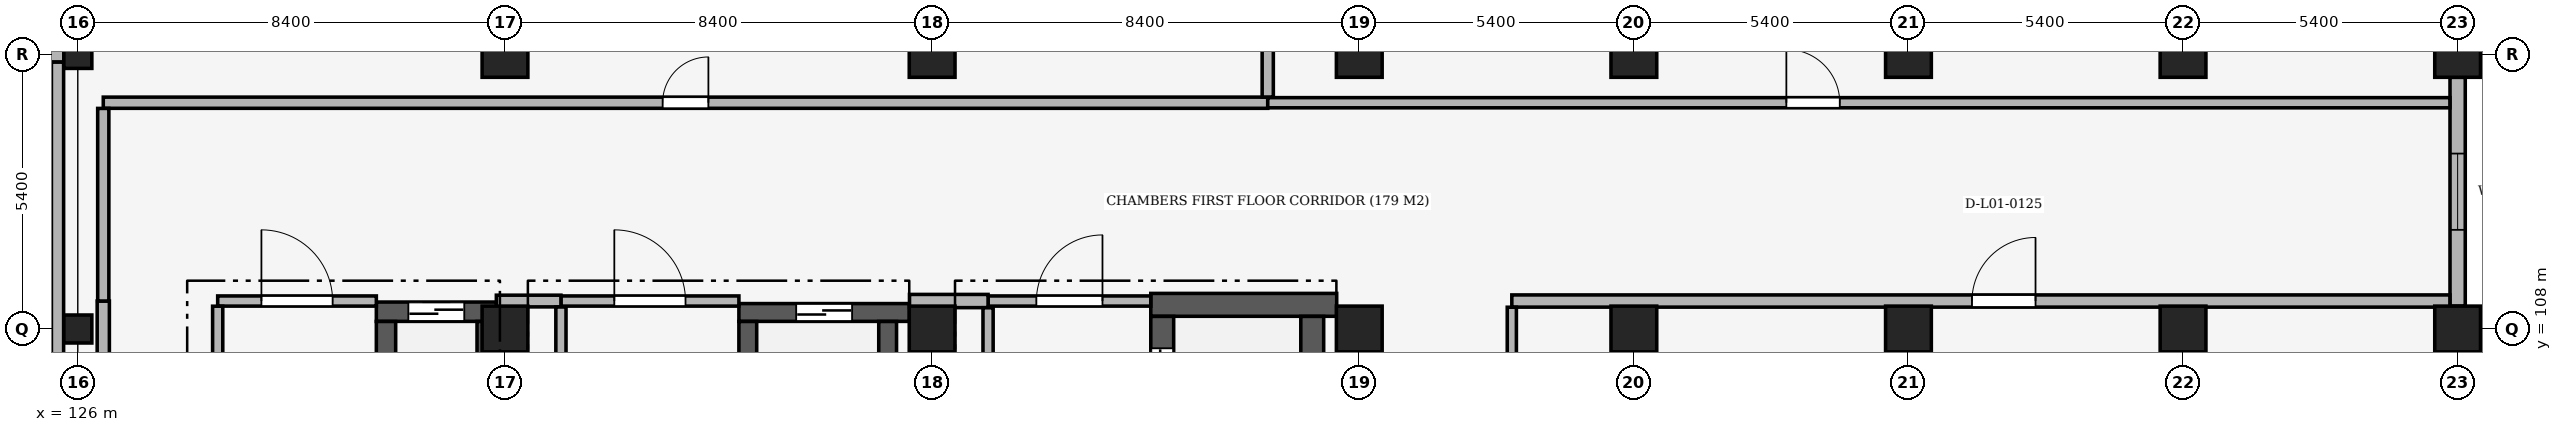
"""IFC4 building model, lengths in metres.
Left out: names, types, materials, properties, quantities, classifications, styles, units other than length and angle.
Written with IfcOpenShell. Run it as: python <this file> out.ifc"""

import sys

from ifc_helpers import new_model, si_unit, direction, frame, frame_2d, origin, origin_2d, place, context, subcontext, project, spatial, rectangle, extrude, element, fill, save


model = new_model("IFC4")
c1 = context("Model", 3, precision=1e-05, world=origin(), true_north=direction((0.0, 1.0)))
c2 = subcontext(c1, "Body", "Model", "MODEL_VIEW")
j1 = project(units=[si_unit("LENGTHUNIT", "METRE"), si_unit("PLANEANGLEUNIT", "RADIAN")], contexts=[c1])
p1 = place(None, origin())
s1 = spatial("IfcSite", under=j1, at=p1, CompositionType="ELEMENT")
p2 = place(p1, origin())
s2 = spatial("IfcBuilding", under=s1, at=p2, CompositionType="ELEMENT")
p3 = place(p2, frame((0.0, 0.0, 5.1)))
s3 = spatial("IfcBuildingStorey", under=s2, at=p3, CompositionType="ELEMENT", Elevation=5.1)
for number, where, z_axis, x_axis in (
    (1, (126.0, 108.0, 0.0), (0.0, 0.0, 1.0), (1.0, 0.0, 0.0)),
    (2, (126.0, 113.4, 0.0), (0.0, 0.0, 1.0), (1.0, 0.0, 0.0)),
):
    element("IfcColumn", number, at=place(p3, frame(where, z_axis=z_axis, x_axis=x_axis)), inside=s3, PredefinedType="COLUMN", context=c2, shape_type="SweptSolid", body=[
        extrude(rectangle(XDim=0.55, YDim=0.55, at=origin_2d()), origin(), (0.0, 0.0, 1.0), 5.1),
    ])
for number, where, z_axis, x_axis in (
    (3, (134.4, 108.0, 0.0), (0.0, 0.0, 1.0), (1.0, 0.0, 0.0)),
    (4, (134.4, 113.4, 0.0), (0.0, 0.0, 1.0), (1.0, 0.0, 0.0)),
    (5, (142.8, 108.0, 0.0), (0.0, 0.0, 1.0), (1.0, 0.0, 0.0)),
    (6, (142.8, 113.4, 0.0), (0.0, 0.0, 1.0), (1.0, 0.0, 0.0)),
    (7, (151.2, 108.0, 0.0), (0.0, 0.0, 1.0), (1.0, 0.0, 0.0)),
    (8, (151.2, 113.4, 0.0), (0.0, 0.0, 1.0), (1.0, 0.0, 0.0)),
    (9, (156.6, 108.0, 0.0), (0.0, 0.0, 1.0), (1.0, 0.0, 0.0)),
    (10, (156.6, 113.4, 0.0), (0.0, 0.0, 1.0), (1.0, 0.0, 0.0)),
    (11, (162.0, 108.0, 0.0), (0.0, 0.0, 1.0), (1.0, 0.0, 0.0)),
    (12, (162.0, 113.4, 0.0), (0.0, 0.0, 1.0), (1.0, 0.0, 0.0)),
    (13, (167.4, 108.0, 0.0), (0.0, 0.0, 1.0), (1.0, 0.0, 0.0)),
    (14, (167.4, 113.4, 0.0), (0.0, 0.0, 1.0), (1.0, 0.0, 0.0)),
    (15, (172.8, 108.0, 0.0), (0.0, 0.0, 1.0), (1.0, 0.0, 0.0)),
    (16, (172.8, 113.4, 0.0), (0.0, 0.0, 1.0), (1.0, 0.0, 0.0)),
):
    element("IfcColumn", number, at=place(p3, frame(where, z_axis=z_axis, x_axis=x_axis)), inside=s3, PredefinedType="COLUMN", context=c2, shape_type="SweptSolid", body=[
        extrude(rectangle(XDim=0.9, YDim=0.9, at=origin_2d()), origin(), (0.0, 0.0, 1.0), 5.1),
    ])
p4 = place(p3, frame((117.875, 113.4, 0.0), z_axis=(0.0, 0.0, 1.0), x_axis=(1.0, 0.0, 0.0)))
e17 = element("IfcWall", 17, at=p4, inside=s3, PredefinedType="SOLIDWALL", context=c2, shape_type="SweptSolid", body=[
    extrude(rectangle(XDim=7.85, YDim=0.3, at=frame_2d((3.925, 0.0))), origin(), (0.0, 0.0, 1.0), 4.12),
])
p5 = place(p4, frame((1.217, 0.0, 0.9)))
e18 = element("IfcOpeningElement", 18, at=p5, cuts=e17, PredefinedType="OPENING", context=c2, shape_type="SweptSolid", body=[
    extrude(rectangle(XDim=2.1, YDim=2.1, at=frame_2d((1.05, 1.05))), frame((0.0, 0.165, 0.0), z_axis=(0.0, -1.0, 0.0), x_axis=(1.0, 0.0, 0.0)), (0.0, 0.0, 1.0), 0.33),
])
p6 = place(p4, frame((4.533, 0.0, 0.9)))
e19 = element("IfcOpeningElement", 19, at=p6, cuts=e17, PredefinedType="OPENING", context=c2, shape_type="SweptSolid", body=[
    extrude(rectangle(XDim=2.1, YDim=2.1, at=frame_2d((1.05, 1.05))), frame((0.0, 0.165, 0.0), z_axis=(0.0, -1.0, 0.0), x_axis=(1.0, 0.0, 0.0)), (0.0, 0.0, 1.0), 0.33),
])
p7 = place(p3, frame((172.8, 112.95, 0.0), z_axis=(0.0, 0.0, 1.0), x_axis=(0.0, -1.0, 0.0)))
e20 = element("IfcWall", 20, at=p7, inside=s3, PredefinedType="SOLIDWALL", context=c2, shape_type="SweptSolid", body=[
    extrude(rectangle(XDim=4.5, YDim=0.3, at=frame_2d((2.25, 0.0))), origin(), (0.0, 0.0, 1.0), 4.27),
])
p8 = place(p7, frame((1.5, 0.0, 0.9)))
e21 = element("IfcOpeningElement", 21, at=p8, cuts=e20, PredefinedType="OPENING", context=c2, shape_type="SweptSolid", body=[
    extrude(rectangle(XDim=1.5, YDim=2.1, at=frame_2d((0.75, 1.05))), frame((0.0, 0.165, 0.0), z_axis=(0.0, -1.0, 0.0), x_axis=(1.0, 0.0, 0.0)), (0.0, 0.0, 1.0), 0.33),
])
p9 = place(p3, frame((131.87, 108.34, 0.0), z_axis=(0.0, 0.0, 1.0), x_axis=(1.0, 0.0, 0.0)))
e22 = element("IfcWall", 22, at=p9, inside=s3, PredefinedType="SHEAR", context=c2, shape_type="SweptSolid", body=[
    extrude(rectangle(XDim=2.36, YDim=0.38, at=frame_2d((1.18, 0.0))), origin(), (0.0, 0.0, 1.0), 4.82),
])
p10 = place(p9, frame((0.63, 0.0, 0.0)))
e23 = element("IfcOpeningElement", 23, at=p10, cuts=e22, PredefinedType="OPENING", context=c2, shape_type="SweptSolid", body=[
    extrude(rectangle(XDim=1.1, YDim=2.15, at=frame_2d((0.55, 1.075))), frame((0.0, 0.205, 0.0), z_axis=(0.0, -1.0, 0.0), x_axis=(1.0, 0.0, 0.0)), (0.0, 0.0, 1.0), 0.41),
])
for number, where, z_axis, x_axis in (
    (24, (132.06, 106.093, 0.0), (0.0, 0.0, 1.0), (0.0, 1.0, 0.0)),
    (25, (134.04, 106.093, 0.0), (0.0, 0.0, 1.0), (0.0, 1.0, 0.0)),
):
    element("IfcWall", number, at=place(p3, frame(where, z_axis=z_axis, x_axis=x_axis)), inside=s3, PredefinedType="SHEAR", context=c2, shape_type="SweptSolid", body=[
        extrude(rectangle(XDim=2.055, YDim=0.38, at=frame_2d((1.027, 0.0))), origin(), (0.0, 0.0, 1.0), 4.82),
    ])
p11 = place(p3, frame((139.0, 108.325, 0.0), z_axis=(0.0, 0.0, 1.0), x_axis=(1.0, 0.0, 0.0)))
e26 = element("IfcWall", 26, at=p11, inside=s3, PredefinedType="SHEAR", context=c2, shape_type="SweptSolid", body=[
    extrude(rectangle(XDim=3.355, YDim=0.35, at=frame_2d((1.677, 0.0))), origin(), (0.0, 0.0, 1.0), 4.82),
])
p12 = place(p11, frame((1.127, 0.0, 0.0)))
e27 = element("IfcOpeningElement", 27, at=p12, cuts=e26, PredefinedType="OPENING", context=c2, shape_type="SweptSolid", body=[
    extrude(rectangle(XDim=1.1, YDim=2.15, at=frame_2d((0.55, 1.075))), frame((0.0, 0.19, 0.0), z_axis=(0.0, -1.0, 0.0), x_axis=(1.0, 0.0, 0.0)), (0.0, 0.0, 1.0), 0.38),
])
for number, where, z_axis, x_axis in (
    (28, (139.175, 106.093, 0.0), (0.0, 0.0, 1.0), (0.0, 1.0, 0.0)),
    (29, (141.925, 106.093, 0.0), (0.0, 0.0, 1.0), (0.0, 1.0, 0.0)),
):
    element("IfcWall", number, at=place(p3, frame(where, z_axis=z_axis, x_axis=x_axis)), inside=s3, PredefinedType="SHEAR", context=c2, shape_type="SweptSolid", body=[
        extrude(rectangle(XDim=2.055, YDim=0.35, at=frame_2d((1.027, 0.0))), origin(), (0.0, 0.0, 1.0), 4.82),
    ])
p13 = place(p3, frame((147.1, 108.475, 0.0), z_axis=(0.0, 0.0, 1.0), x_axis=(1.0, 0.0, 0.0)))
e30 = element("IfcWall", 30, at=p13, inside=s3, PredefinedType="SHEAR", context=c2, shape_type="SweptSolid", body=[
    extrude(rectangle(XDim=3.656, YDim=0.45, at=frame_2d((1.828, 0.0))), origin(), (0.0, 0.0, 1.0), 4.82),
])
p14 = place(p3, frame((147.325, 105.793, 0.0), z_axis=(0.0, 0.0, 1.0), x_axis=(0.0, 1.0, 0.0)))
e31 = element("IfcWall", 31, at=p14, inside=s3, PredefinedType="SHEAR", context=c2, shape_type="SweptSolid", body=[
    extrude(rectangle(XDim=2.455, YDim=0.45, at=frame_2d((1.228, 0.0))), origin(), (0.0, 0.0, 1.0), 4.82),
])
p15 = place(p14, frame((0.627, 0.0, 0.0)))
e32 = element("IfcOpeningElement", 32, at=p15, cuts=e31, PredefinedType="OPENING", context=c2, shape_type="SweptSolid", body=[
    extrude(rectangle(XDim=1.2, YDim=2.15, at=frame_2d((0.6, 1.075))), frame((0.0, 0.24, 0.0), z_axis=(0.0, -1.0, 0.0), x_axis=(1.0, 0.0, 0.0)), (0.0, 0.0, 1.0), 0.48),
])
p16 = place(p3, frame((150.275, 105.793, 0.0), z_axis=(0.0, 0.0, 1.0), x_axis=(0.0, 1.0, 0.0)))
e33 = element("IfcWall", 33, at=p16, inside=s3, PredefinedType="SHEAR", context=c2, shape_type="SweptSolid", body=[
    extrude(rectangle(XDim=2.455, YDim=0.45, at=frame_2d((1.228, 0.0))), origin(), (0.0, 0.0, 1.0), 4.82),
])
p17 = place(p3, frame((128.75, 108.55, 0.0), z_axis=(0.0, 0.0, 1.0), x_axis=(1.0, 0.0, 0.0)))
e34 = element("IfcWall", 34, at=p17, inside=s3, PredefinedType="PARTITIONING", context=c2, shape_type="SweptSolid", body=[
    extrude(rectangle(XDim=3.12, YDim=0.2, at=frame_2d((1.56, 0.0))), origin(), (0.0, 0.0, 1.0), 4.82),
])
p18 = place(p17, frame((0.86, 0.0, 0.0)))
e35 = element("IfcOpeningElement", 35, at=p18, cuts=e34, PredefinedType="OPENING", context=c2, shape_type="SweptSolid", body=[
    extrude(rectangle(XDim=1.4, YDim=2.2, at=frame_2d((0.7, 1.1))), frame((0.0, 0.115, 0.0), z_axis=(0.0, -1.0, 0.0), x_axis=(1.0, 0.0, 0.0)), (0.0, 0.0, 1.0), 0.23),
])
p19 = place(p3, frame((135.5, 108.55, 0.0), z_axis=(0.0, 0.0, 1.0), x_axis=(1.0, 0.0, 0.0)))
e36 = element("IfcWall", 36, at=p19, inside=s3, PredefinedType="PARTITIONING", context=c2, shape_type="SweptSolid", body=[
    extrude(rectangle(XDim=3.5, YDim=0.2, at=frame_2d((1.75, 0.0))), origin(), (0.0, 0.0, 1.0), 4.82),
])
p20 = place(p19, frame((1.05, 0.0, 0.0)))
e37 = element("IfcOpeningElement", 37, at=p20, cuts=e36, PredefinedType="OPENING", context=c2, shape_type="SweptSolid", body=[
    extrude(rectangle(XDim=1.4, YDim=2.2, at=frame_2d((0.7, 1.1))), frame((0.0, 0.115, 0.0), z_axis=(0.0, -1.0, 0.0), x_axis=(1.0, 0.0, 0.0)), (0.0, 0.0, 1.0), 0.23),
])
p21 = place(p3, frame((143.9, 108.55, 0.0), z_axis=(0.0, 0.0, 1.0), x_axis=(1.0, 0.0, 0.0)))
e38 = element("IfcWall", 38, at=p21, inside=s3, PredefinedType="PARTITIONING", context=c2, shape_type="SweptSolid", body=[
    extrude(rectangle(XDim=3.2, YDim=0.2, at=frame_2d((1.6, 0.0))), origin(), (0.0, 0.0, 1.0), 4.82),
])
p22 = place(p21, frame((0.95, 0.0, 0.0)))
e39 = element("IfcOpeningElement", 39, at=p22, cuts=e38, PredefinedType="OPENING", context=c2, shape_type="SweptSolid", body=[
    extrude(rectangle(XDim=1.3, YDim=2.2, at=frame_2d((0.65, 1.1))), frame((0.0, 0.115, 0.0), z_axis=(0.0, -1.0, 0.0), x_axis=(1.0, 0.0, 0.0)), (0.0, 0.0, 1.0), 0.23),
])
p23 = place(p3, frame((134.23, 108.55, 0.0), z_axis=(0.0, 0.0, 1.0), x_axis=(1.0, 0.0, 0.0)))
e40 = element("IfcWall", 40, at=p23, inside=s3, PredefinedType="SOLIDWALL", context=c2, shape_type="SweptSolid", body=[
    extrude(rectangle(XDim=1.27, YDim=0.23, at=frame_2d((0.635, 0.0))), origin(), (0.0, 0.0, 1.0), 4.27),
])
p24 = place(p3, frame((142.355, 108.55, 0.0), z_axis=(0.0, 0.0, 1.0), x_axis=(1.0, 0.0, 0.0)))
e41 = element("IfcWall", 41, at=p24, inside=s3, PredefinedType="PARTITIONING", context=c2, shape_type="SweptSolid", body=[
    extrude(rectangle(XDim=1.545, YDim=0.26, at=frame_2d((0.772, 0.0))), origin(), (0.0, 0.0, 1.0), 4.27),
])
p25 = place(p3, frame((154.2, 108.55, 0.0), z_axis=(0.0, 0.0, 1.0), x_axis=(1.0, 0.0, 0.0)))
e42 = element("IfcWall", 42, at=p25, inside=s3, PredefinedType="PARTITIONING", context=c2, shape_type="SweptSolid", body=[
    extrude(rectangle(XDim=18.448, YDim=0.24, at=frame_2d((9.224, 0.0))), origin(), (0.0, 0.0, 1.0), 4.27),
])
p26 = place(p25, frame((9.049, 0.0, 0.0)))
e43 = element("IfcOpeningElement", 43, at=p26, cuts=e42, PredefinedType="OPENING", context=c2, shape_type="SweptSolid", body=[
    extrude(rectangle(XDim=1.25, YDim=2.2, at=frame_2d((0.625, 1.1))), frame((0.0, 0.135, 0.0), z_axis=(0.0, -1.0, 0.0), x_axis=(1.0, 0.0, 0.0)), (0.0, 0.0, 1.0), 0.27),
])
p27 = place(p3, frame((126.5, 112.45, 0.0), z_axis=(0.0, 0.0, 1.0), x_axis=(1.0, 0.0, 0.0)))
e44 = element("IfcWall", 44, at=p27, inside=s3, PredefinedType="PARTITIONING", context=c2, shape_type="SweptSolid", body=[
    extrude(rectangle(XDim=22.9, YDim=0.22, at=frame_2d((11.45, 0.0))), origin(), (0.0, 0.0, 1.0), 4.27),
])
p28 = place(p27, frame((11.0, 0.0, 0.0)))
e45 = element("IfcOpeningElement", 45, at=p28, cuts=e44, PredefinedType="OPENING", context=c2, shape_type="SweptSolid", body=[
    extrude(rectangle(XDim=0.9, YDim=2.1, at=frame_2d((0.45, 1.05))), frame((0.0, 0.125, 0.0), z_axis=(0.0, -1.0, 0.0), x_axis=(1.0, 0.0, 0.0)), (0.0, 0.0, 1.0), 0.25),
])
p29 = place(p3, frame((149.4, 112.45, 0.0), z_axis=(0.0, 0.0, 1.0), x_axis=(1.0, 0.0, 0.0)))
e46 = element("IfcWall", 46, at=p29, inside=s3, PredefinedType="PARTITIONING", context=c2, shape_type="SweptSolid", body=[
    extrude(rectangle(XDim=23.248, YDim=0.2, at=frame_2d((11.624, 0.0))), origin(), (0.0, 0.0, 1.0), 4.27),
])
p30 = place(p29, frame((10.199, 0.0, 0.0)))
e47 = element("IfcOpeningElement", 47, at=p30, cuts=e46, PredefinedType="OPENING", context=c2, shape_type="SweptSolid", body=[
    extrude(rectangle(XDim=1.05, YDim=2.1, at=frame_2d((0.525, 1.05))), frame((0.0, 0.115, 0.0), z_axis=(0.0, -1.0, 0.0), x_axis=(1.0, 0.0, 0.0)), (0.0, 0.0, 1.0), 0.23),
])
p31 = place(p3, frame((125.6, 103.522, 0.0), z_axis=(0.0, 0.0, 1.0), x_axis=(0.0, 1.0, 0.0)))
e48 = element("IfcWall", 48, at=p31, inside=s3, PredefinedType="PARTITIONING", context=c2, shape_type="SweptSolid", body=[
    extrude(rectangle(XDim=9.726, YDim=0.24, at=frame_2d((4.863, 0.0))), origin(), (0.0, 0.0, 1.0), 4.12),
])
p32 = place(p3, frame((126.5, 103.522, 0.0), z_axis=(0.0, 0.0, 1.0), x_axis=(0.0, 1.0, 0.0)))
e49 = element("IfcWall", 49, at=p32, inside=s3, PredefinedType="PARTITIONING", context=c2, shape_type="SweptSolid", body=[
    extrude(rectangle(XDim=5.028, YDim=0.24, at=frame_2d((2.514, 0.0))), origin(), (0.0, 0.0, 1.0), 4.82),
])
p33 = place(p3, frame((126.5, 108.55, 0.0), z_axis=(0.0, 0.0, 1.0), x_axis=(0.0, 1.0, 0.0)))
e50 = element("IfcWall", 50, at=p33, inside=s3, PredefinedType="PARTITIONING", context=c2, shape_type="SweptSolid", body=[
    extrude(rectangle(XDim=3.788, YDim=0.22, at=frame_2d((1.894, 0.0))), origin(), (0.0, 0.0, 1.0), 4.82),
])
p34 = place(p3, frame((128.75, 103.632, 0.0), z_axis=(0.0, 0.0, 1.0), x_axis=(0.0, 1.0, 0.0)))
e51 = element("IfcWall", 51, at=p34, inside=s3, PredefinedType="PARTITIONING", context=c2, shape_type="SweptSolid", body=[
    extrude(rectangle(XDim=4.816, YDim=0.2, at=frame_2d((2.408, 0.0))), origin(), (0.0, 0.0, 1.0), 4.82),
])
p35 = place(p3, frame((135.5, 103.602, 0.0), z_axis=(0.0, 0.0, 1.0), x_axis=(0.0, 1.0, 0.0)))
e52 = element("IfcWall", 52, at=p35, inside=s3, PredefinedType="PARTITIONING", context=c2, shape_type="SweptSolid", body=[
    extrude(rectangle(XDim=4.831, YDim=0.2, at=frame_2d((2.416, 0.0))), origin(), (0.0, 0.0, 1.0), 4.82),
])
p36 = place(p3, frame((143.9, 103.702, 0.0), z_axis=(0.0, 0.0, 1.0), x_axis=(0.0, 1.0, 0.0)))
e53 = element("IfcWall", 53, at=p36, inside=s3, PredefinedType="PARTITIONING", context=c2, shape_type="SweptSolid", body=[
    extrude(rectangle(XDim=4.716, YDim=0.2, at=frame_2d((2.358, 0.0))), origin(), (0.0, 0.0, 1.0), 4.82),
])
p37 = place(p3, frame((149.4, 112.562, 0.0), z_axis=(0.0, 0.0, 1.0), x_axis=(0.0, 1.0, 0.0)))
e54 = element("IfcWall", 54, at=p37, inside=s3, PredefinedType="PARTITIONING", context=c2, shape_type="SweptSolid", body=[
    extrude(rectangle(XDim=6.086, YDim=0.22, at=frame_2d((3.043, 0.0))), origin(), (0.0, 0.0, 1.0), 4.12),
])
p38 = place(p3, frame((154.2, 93.752, 0.0), z_axis=(0.0, 0.0, 1.0), x_axis=(0.0, 1.0, 0.0)))
e55 = element("IfcWall", 55, at=p38, inside=s3, PredefinedType="PARTITIONING", context=c2, shape_type="SweptSolid", body=[
    extrude(rectangle(XDim=14.676, YDim=0.18, at=frame_2d((7.338, 0.0))), origin(), (0.0, 0.0, 1.0), 4.22),
])
p39 = place(p8, origin())
e56 = element("IfcWindow", 56, at=p39, inside=s3, PartitioningType="SINGLE_PANEL", PredefinedType="WINDOW", context=c2, shape_type="SweptSolid", body=[
    extrude(rectangle(XDim=1.5, YDim=2.1, at=frame_2d((0.75, 1.05))), frame((0.0, 0.03, 0.0), z_axis=(0.0, -1.0, 0.0), x_axis=(1.0, 0.0, 0.0)), (0.0, 0.0, 1.0), 0.06),
])
fill(e21, e56)
p40 = place(p10, origin())
e57 = element("IfcDoor", 57, at=p40, inside=s3, OperationType="DOUBLE_DOOR_SLIDING", PredefinedType="DOOR", context=c2, shape_type="SweptSolid", body=[
    extrude(rectangle(XDim=1.1, YDim=2.15, at=frame_2d((0.55, 1.075))), frame((0.0, 0.025, 0.0), z_axis=(0.0, -1.0, 0.0), x_axis=(1.0, 0.0, 0.0)), (0.0, 0.0, 1.0), 0.05),
])
fill(e23, e57)
p41 = place(p12, origin())
e58 = element("IfcDoor", 58, at=p41, inside=s3, OperationType="DOUBLE_DOOR_SLIDING", PredefinedType="DOOR", context=c2, shape_type="SweptSolid", body=[
    extrude(rectangle(XDim=1.1, YDim=2.15, at=frame_2d((0.55, 1.075))), frame((0.0, 0.025, 0.0), z_axis=(0.0, -1.0, 0.0), x_axis=(1.0, 0.0, 0.0)), (0.0, 0.0, 1.0), 0.05),
])
fill(e27, e58)
p42 = place(p15, origin())
e59 = element("IfcDoor", 59, at=p42, inside=s3, OperationType="DOUBLE_DOOR_SLIDING", PredefinedType="DOOR", context=c2, shape_type="SweptSolid", body=[
    extrude(rectangle(XDim=1.2, YDim=2.15, at=frame_2d((0.6, 1.075))), frame((0.0, 0.025, 0.0), z_axis=(0.0, -1.0, 0.0), x_axis=(1.0, 0.0, 0.0)), (0.0, 0.0, 1.0), 0.05),
])
fill(e32, e59)
p43 = place(p18, origin())
e60 = element("IfcDoor", 60, at=p43, inside=s3, OperationType="SINGLE_SWING_LEFT", PredefinedType="DOOR", context=c2, shape_type="SweptSolid", body=[
    extrude(rectangle(XDim=1.4, YDim=2.2, at=frame_2d((0.7, 1.1))), frame((0.0, 0.025, 0.0), z_axis=(0.0, -1.0, 0.0), x_axis=(1.0, 0.0, 0.0)), (0.0, 0.0, 1.0), 0.05),
])
fill(e35, e60)
p44 = place(p20, origin())
e61 = element("IfcDoor", 61, at=p44, inside=s3, OperationType="SINGLE_SWING_LEFT", PredefinedType="DOOR", context=c2, shape_type="SweptSolid", body=[
    extrude(rectangle(XDim=1.4, YDim=2.2, at=frame_2d((0.7, 1.1))), frame((0.0, 0.025, 0.0), z_axis=(0.0, -1.0, 0.0), x_axis=(1.0, 0.0, 0.0)), (0.0, 0.0, 1.0), 0.05),
])
fill(e37, e61)
p45 = place(p22, origin())
e62 = element("IfcDoor", 62, at=p45, inside=s3, OperationType="SINGLE_SWING_RIGHT", PredefinedType="DOOR", context=c2, shape_type="SweptSolid", body=[
    extrude(rectangle(XDim=1.3, YDim=2.2, at=frame_2d((0.65, 1.1))), frame((0.0, 0.025, 0.0), z_axis=(0.0, -1.0, 0.0), x_axis=(1.0, 0.0, 0.0)), (0.0, 0.0, 1.0), 0.05),
])
fill(e39, e62)
p46 = place(p28, origin())
e63 = element("IfcDoor", 63, at=p46, inside=s3, OperationType="SINGLE_SWING_RIGHT", PredefinedType="DOOR", context=c2, shape_type="SweptSolid", body=[
    extrude(rectangle(XDim=0.9, YDim=2.1, at=frame_2d((0.45, 1.05))), frame((0.0, 0.025, 0.0), z_axis=(0.0, -1.0, 0.0), x_axis=(1.0, 0.0, 0.0)), (0.0, 0.0, 1.0), 0.05),
])
fill(e45, e63)
p47 = place(p30, origin())
e64 = element("IfcDoor", 64, at=p47, inside=s3, OperationType="SINGLE_SWING_LEFT", PredefinedType="DOOR", context=c2, shape_type="SweptSolid", body=[
    extrude(rectangle(XDim=1.05, YDim=2.1, at=frame_2d((0.525, 1.05))), frame((0.0, 0.025, 0.0), z_axis=(0.0, -1.0, 0.0), x_axis=(1.0, 0.0, 0.0)), (0.0, 0.0, 1.0), 0.05),
])
fill(e47, e64)
p48 = place(p26, origin())
e65 = element("IfcDoor", 65, at=p48, inside=s3, OperationType="SINGLE_SWING_RIGHT", PredefinedType="DOOR", context=c2, shape_type="SweptSolid", body=[
    extrude(rectangle(XDim=1.25, YDim=2.2, at=frame_2d((0.625, 1.1))), frame((0.0, 0.025, 0.0), z_axis=(0.0, -1.0, 0.0), x_axis=(1.0, 0.0, 0.0)), (0.0, 0.0, 1.0), 0.05),
])
fill(e43, e65)
save(model, sys.argv[1])
